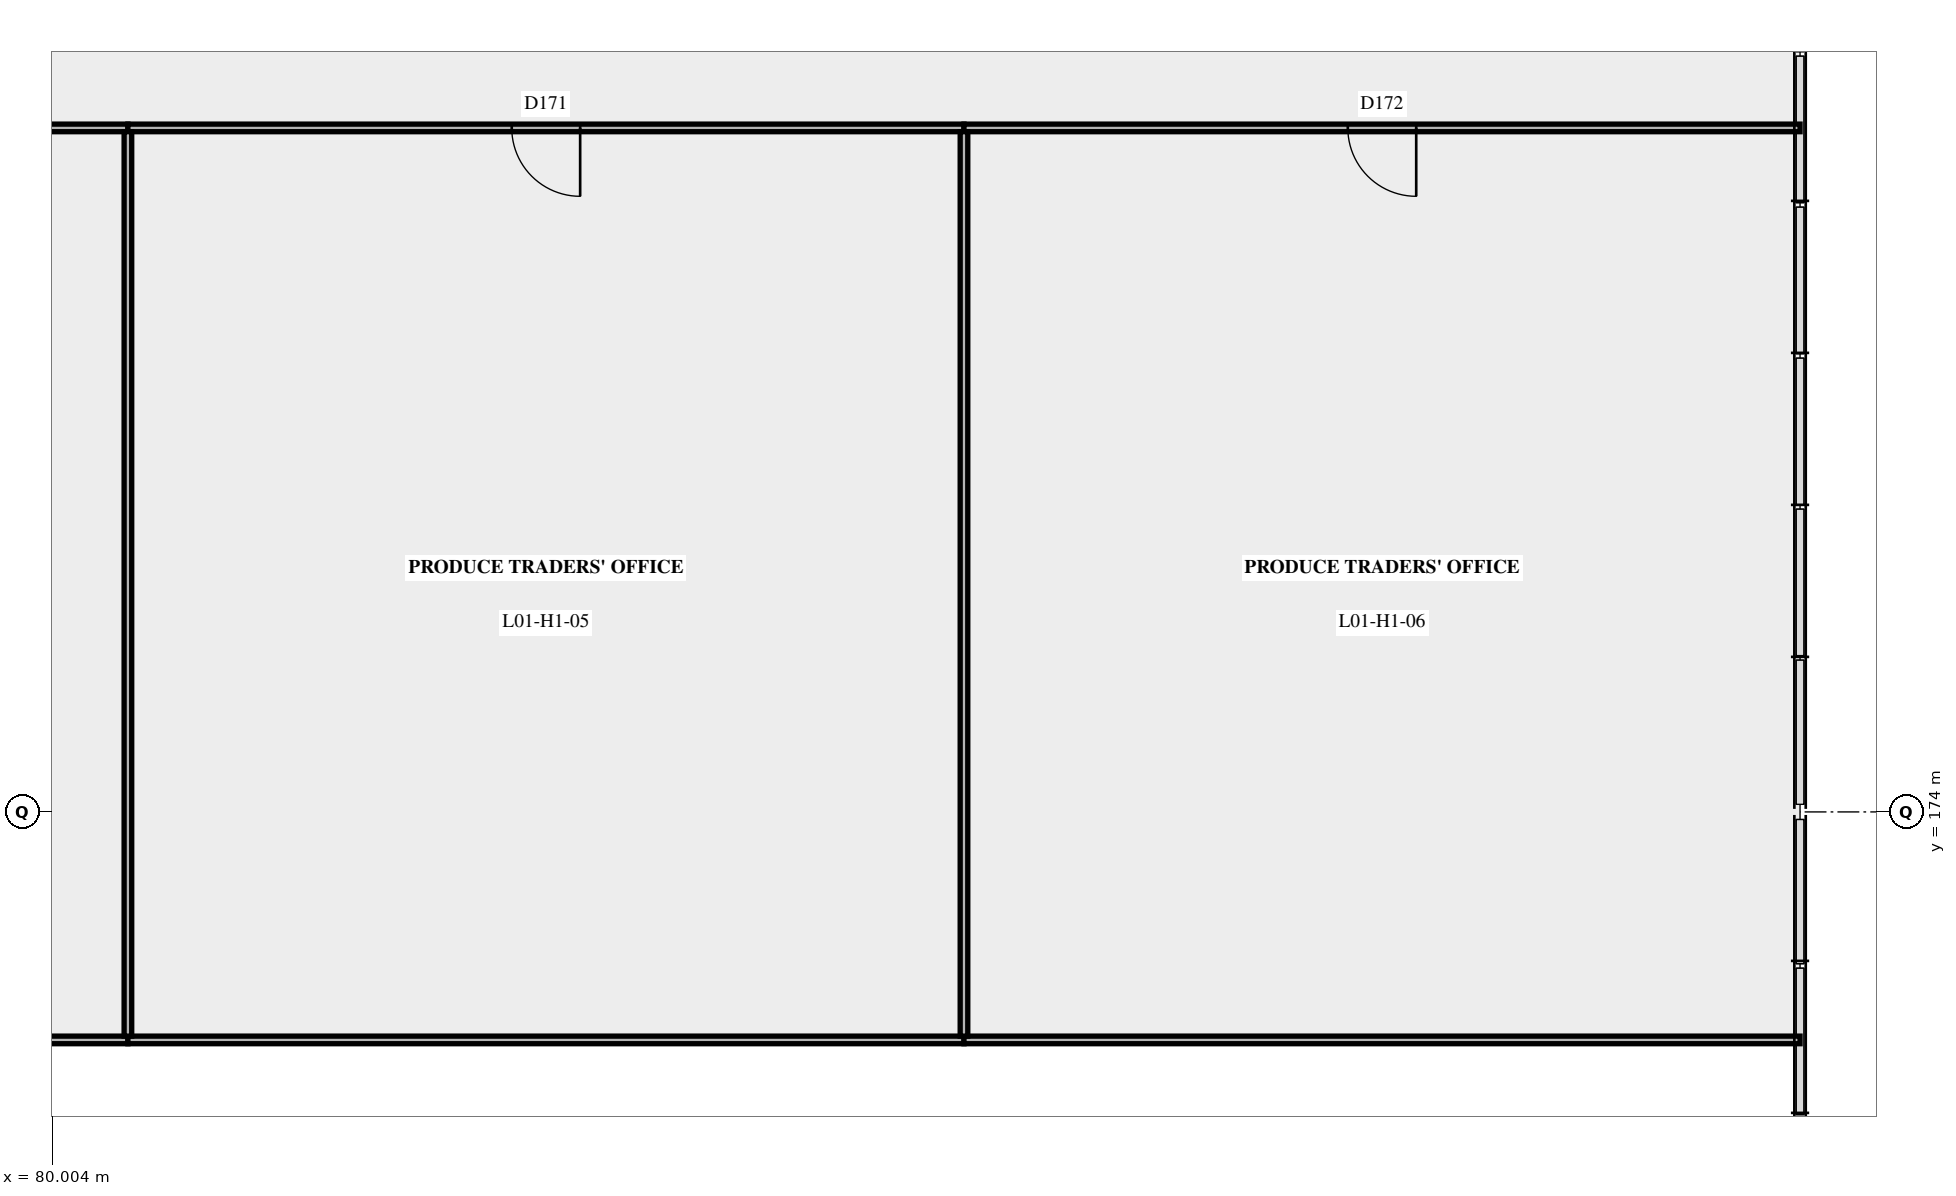
"""IFC4 building model, lengths in metres.
Left out: names, types, materials, properties, quantities, classifications, styles, units other than length and angle.
Written with IfcOpenShell. Run it as: python <this file> out.ifc"""

import sys

from ifc_helpers import new_model, si_unit, direction, frame, frame_2d, origin, place, context, subcontext, project, spatial, rectangle, extrude, element, fill, save


model = new_model("IFC4")
c1 = context("Model", 3, precision=1e-05, world=origin(), true_north=direction((0.0, 1.0)))
c2 = subcontext(c1, "Body", "Model", "MODEL_VIEW")
j1 = project(units=[si_unit("LENGTHUNIT", "METRE"), si_unit("PLANEANGLEUNIT", "RADIAN")], contexts=[c1])
p1 = place(None, origin())
s1 = spatial("IfcSite", under=j1, at=p1, CompositionType="ELEMENT")
p2 = place(p1, origin())
s2 = spatial("IfcBuilding", under=s1, at=p2, CompositionType="ELEMENT")
p3 = place(p2, frame((0.0, 0.0, 5.4)))
s3 = spatial("IfcBuildingStorey", under=s2, at=p3, CompositionType="ELEMENT", Elevation=5.4)
for number, where, z_axis, x_axis in (
    (1, (70.0, 171.0, 0.0), (0.0, 0.0, 1.0), (1.0, 0.0, 0.0)),
    (2, (81.0, 171.0, 0.0), (0.0, 0.0, 1.0), (1.0, 0.0, 0.0)),
    (3, (92.0, 171.0, 0.0), (0.0, 0.0, 1.0), (1.0, 0.0, 0.0)),
):
    element("IfcWall", number, at=place(p3, frame(where, z_axis=z_axis, x_axis=x_axis)), inside=s3, PredefinedType="PARTITIONING", context=c2, shape_type="SweptSolid", body=[
        extrude(rectangle(XDim=11.0, YDim=0.1, at=frame_2d((5.5, 0.0))), origin(), (0.0, 0.0, 1.0), 3.6),
    ])
p4 = place(p3, frame((70.0, 183.0, 0.0), z_axis=(0.0, 0.0, 1.0), x_axis=(1.0, 0.0, 0.0)))
e4 = element("IfcWall", 4, at=p4, inside=s3, PredefinedType="PARTITIONING", context=c2, shape_type="SweptSolid", body=[
    extrude(rectangle(XDim=11.0, YDim=0.1, at=frame_2d((5.5, 0.0))), origin(), (0.0, 0.0, 1.0), 3.6),
])
p5 = place(p4, frame((5.05, 0.0, 0.0)))
e5 = element("IfcOpeningElement", 5, at=p5, cuts=e4, PredefinedType="OPENING", context=c2, shape_type="SweptSolid", body=[
    extrude(rectangle(XDim=0.9, YDim=2.1, at=frame_2d((0.45, 1.05))), frame((0.0, 0.06, 0.0), z_axis=(0.0, -1.0, 0.0), x_axis=(1.0, 0.0, 0.0)), (0.0, 0.0, 1.0), 0.12),
])
p6 = place(p3, frame((81.0, 183.0, 0.0), z_axis=(0.0, 0.0, 1.0), x_axis=(1.0, 0.0, 0.0)))
e6 = element("IfcWall", 6, at=p6, inside=s3, PredefinedType="PARTITIONING", context=c2, shape_type="SweptSolid", body=[
    extrude(rectangle(XDim=11.0, YDim=0.1, at=frame_2d((5.5, 0.0))), origin(), (0.0, 0.0, 1.0), 3.6),
])
p7 = place(p6, frame((5.05, 0.0, 0.0)))
e7 = element("IfcOpeningElement", 7, at=p7, cuts=e6, PredefinedType="OPENING", context=c2, shape_type="SweptSolid", body=[
    extrude(rectangle(XDim=0.9, YDim=2.1, at=frame_2d((0.45, 1.05))), frame((0.0, 0.06, 0.0), z_axis=(0.0, -1.0, 0.0), x_axis=(1.0, 0.0, 0.0)), (0.0, 0.0, 1.0), 0.12),
])
p8 = place(p3, frame((92.0, 183.0, 0.0), z_axis=(0.0, 0.0, 1.0), x_axis=(1.0, 0.0, 0.0)))
e8 = element("IfcWall", 8, at=p8, inside=s3, PredefinedType="PARTITIONING", context=c2, shape_type="SweptSolid", body=[
    extrude(rectangle(XDim=11.0, YDim=0.1, at=frame_2d((5.5, 0.0))), origin(), (0.0, 0.0, 1.0), 3.6),
])
p9 = place(p8, frame((5.05, 0.0, 0.0)))
e9 = element("IfcOpeningElement", 9, at=p9, cuts=e8, PredefinedType="OPENING", context=c2, shape_type="SweptSolid", body=[
    extrude(rectangle(XDim=0.9, YDim=2.1, at=frame_2d((0.45, 1.05))), frame((0.0, 0.06, 0.0), z_axis=(0.0, -1.0, 0.0), x_axis=(1.0, 0.0, 0.0)), (0.0, 0.0, 1.0), 0.12),
])
for number, where, z_axis, x_axis in (
    (10, (81.0, 171.05, 0.0), (0.0, 0.0, 1.0), (0.0, 1.0, 0.0)),
    (11, (92.0, 171.05, 0.0), (0.0, 0.0, 1.0), (0.0, 1.0, 0.0)),
):
    element("IfcWall", number, at=place(p3, frame(where, z_axis=z_axis, x_axis=x_axis)), inside=s3, PredefinedType="PARTITIONING", context=c2, shape_type="SweptSolid", body=[
        extrude(rectangle(XDim=11.9, YDim=0.1, at=frame_2d((5.95, 0.0))), origin(), (0.0, 0.0, 1.0), 3.6),
    ])
p10 = place(p7, origin())
e12 = element("IfcDoor", 12, at=p10, inside=s3, OperationType="SINGLE_SWING_LEFT", PredefinedType="DOOR", context=c2, shape_type="SweptSolid", body=[
    extrude(rectangle(XDim=0.9, YDim=2.1, at=frame_2d((0.45, 1.05))), frame((0.0, 0.025, 0.0), z_axis=(0.0, -1.0, 0.0), x_axis=(1.0, 0.0, 0.0)), (0.0, 0.0, 1.0), 0.05),
])
fill(e7, e12)
p11 = place(p9, origin())
e13 = element("IfcDoor", 13, at=p11, inside=s3, OperationType="SINGLE_SWING_LEFT", PredefinedType="DOOR", context=c2, shape_type="SweptSolid", body=[
    extrude(rectangle(XDim=0.9, YDim=2.1, at=frame_2d((0.45, 1.05))), frame((0.0, 0.025, 0.0), z_axis=(0.0, -1.0, 0.0), x_axis=(1.0, 0.0, 0.0)), (0.0, 0.0, 1.0), 0.05),
])
fill(e9, e13)
save(model, sys.argv[1])
